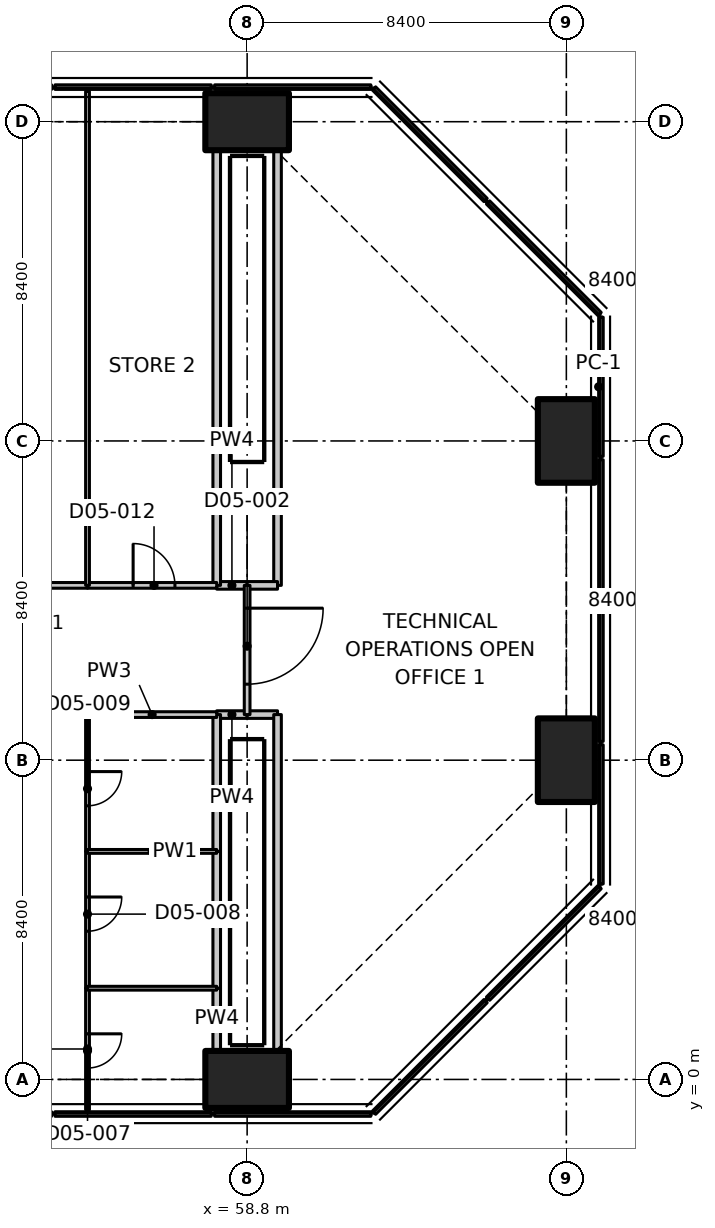
"""IFC4 building model, lengths in metres.
Left out: names, types, materials, properties, quantities, classifications, styles, units other than length and angle.
Written with IfcOpenShell. Run it as: python <this file> out.ifc"""

import sys

from ifc_helpers import new_model, si_unit, direction, frame, frame_2d, origin, origin_2d, place, context, subcontext, project, spatial, polyline, rectangle, outline, extrude, element, fill, save


model = new_model("IFC4")
c1 = context("Model", 3, precision=1e-05, world=origin(), true_north=direction((0.0, 1.0)))
c2 = subcontext(c1, "Body", "Model", "MODEL_VIEW")
j1 = project(units=[si_unit("LENGTHUNIT", "METRE"), si_unit("PLANEANGLEUNIT", "RADIAN")], contexts=[c1])
p1 = place(None, origin())
s1 = spatial("IfcSite", under=j1, at=p1, CompositionType="ELEMENT")
p2 = place(p1, origin())
s2 = spatial("IfcBuilding", under=s1, at=p2, CompositionType="ELEMENT")
p3 = place(p2, frame((0.0, 0.0, 27.5)))
s3 = spatial("IfcBuildingStorey", under=s2, at=p3, CompositionType="ELEMENT", Elevation=27.5)
for number, where, z_axis, x_axis in (
    (1, (58.8, 0.0, 0.0), (0.0, 0.0, 1.0), (0.0, 1.0, 0.0)),
    (2, (58.8, 25.2, 0.0), (0.0, 0.0, 1.0), (0.0, 1.0, 0.0)),
    (3, (67.2, 8.4, 0.0), (0.0, 0.0, 1.0), (1.0, 0.0, 0.0)),
    (4, (67.2, 16.8, 0.0), (0.0, 0.0, 1.0), (1.0, 0.0, 0.0)),
):
    element("IfcColumn", number, at=place(p3, frame(where, z_axis=z_axis, x_axis=x_axis)), inside=s3, PredefinedType="COLUMN", context=c2, shape_type="SweptSolid", body=[
        extrude(rectangle(XDim=1.5, YDim=2.2, at=origin_2d()), origin(), (0.0, 0.0, 1.0), 4.25),
    ])
p4 = place(p3, origin())
e5 = element("IfcWall", 5, at=p4, inside=s3, PredefinedType="SOLIDWALL", context=c2, shape_type="SweptSolid", body=[
    extrude(outline(polyline([(57.855, -0.97), (57.855, -0.85), (53.745, -0.85), (53.745, -0.97), (57.855, -0.97)])), origin(), (0.0, 0.0, 1.0), 4.25),
])
p5 = place(p3, origin())
e6 = element("IfcWall", 6, at=p5, inside=s3, PredefinedType="SOLIDWALL", context=c2, shape_type="SweptSolid", body=[
    extrude(outline(polyline([(62.055, -0.97), (62.055, -0.85), (57.945, -0.85), (57.945, -0.97), (62.055, -0.97)])), origin(), (0.0, 0.0, 1.0), 4.25),
])
p6 = place(p3, origin())
e7 = element("IfcWall", 7, at=p6, inside=s3, PredefinedType="SOLIDWALL", context=c2, shape_type="SweptSolid", body=[
    extrude(outline(polyline([(62.096, -0.833), (65.033, 2.104), (65.118, 2.019), (62.181, -0.918), (62.096, -0.833)])), origin(), (0.0, 0.0, 1.0), 4.25),
])
p7 = place(p3, origin())
e8 = element("IfcWall", 8, at=p7, inside=s3, PredefinedType="SOLIDWALL", context=c2, shape_type="SweptSolid", body=[
    extrude(outline(polyline([(65.096, 2.167), (68.033, 5.104), (68.118, 5.019), (65.181, 2.082), (65.096, 2.167)])), origin(), (0.0, 0.0, 1.0), 4.25),
])
p8 = place(p3, origin())
e9 = element("IfcWall", 9, at=p8, inside=s3, PredefinedType="SOLIDWALL", context=c2, shape_type="SweptSolid", body=[
    extrude(outline(polyline([(68.17, 8.805), (68.05, 8.805), (68.05, 5.145), (68.17, 5.145), (68.17, 8.805)])), origin(), (0.0, 0.0, 1.0), 4.25),
])
p9 = place(p3, origin())
e10 = element("IfcWall", 10, at=p9, inside=s3, PredefinedType="SOLIDWALL", context=c2, shape_type="SweptSolid", body=[
    extrude(outline(polyline([(68.17, 12.555), (68.05, 12.555), (68.05, 8.895), (68.17, 8.895), (68.17, 12.555)])), origin(), (0.0, 0.0, 1.0), 4.25),
])
p10 = place(p3, origin())
e11 = element("IfcWall", 11, at=p10, inside=s3, PredefinedType="SOLIDWALL", context=c2, shape_type="SweptSolid", body=[
    extrude(outline(polyline([(68.17, 16.305), (68.05, 16.305), (68.05, 12.645), (68.17, 12.645), (68.17, 16.305)])), origin(), (0.0, 0.0, 1.0), 4.25),
])
p11 = place(p3, origin())
e12 = element("IfcWall", 12, at=p11, inside=s3, PredefinedType="SOLIDWALL", context=c2, shape_type="SweptSolid", body=[
    extrude(outline(polyline([(68.17, 20.055), (68.05, 20.055), (68.05, 16.395), (68.17, 16.395), (68.17, 20.055)])), origin(), (0.0, 0.0, 1.0), 4.25),
])
p12 = place(p3, origin())
e13 = element("IfcWall", 13, at=p12, inside=s3, PredefinedType="SOLIDWALL", context=c2, shape_type="SweptSolid", body=[
    extrude(outline(polyline([(68.033, 20.096), (65.096, 23.033), (65.181, 23.118), (68.118, 20.181), (68.033, 20.096)])), origin(), (0.0, 0.0, 1.0), 4.25),
])
p13 = place(p3, origin())
e14 = element("IfcWall", 14, at=p13, inside=s3, PredefinedType="SOLIDWALL", context=c2, shape_type="SweptSolid", body=[
    extrude(outline(polyline([(65.033, 23.096), (62.096, 26.033), (62.181, 26.118), (65.118, 23.181), (65.033, 23.096)])), origin(), (0.0, 0.0, 1.0), 4.25),
])
p14 = place(p3, origin())
e15 = element("IfcWall", 15, at=p14, inside=s3, PredefinedType="SOLIDWALL", context=c2, shape_type="SweptSolid", body=[
    extrude(outline(polyline([(57.945, 26.17), (57.945, 26.05), (62.055, 26.05), (62.055, 26.17), (57.945, 26.17)])), origin(), (0.0, 0.0, 1.0), 4.25),
])
p15 = place(p3, origin())
e16 = element("IfcWall", 16, at=p15, inside=s3, PredefinedType="SOLIDWALL", context=c2, shape_type="SweptSolid", body=[
    extrude(outline(polyline([(53.745, 26.17), (53.745, 26.05), (57.855, 26.05), (57.855, 26.17), (53.745, 26.17)])), origin(), (0.0, 0.0, 1.0), 4.25),
])
for number, where, z_axis, x_axis in (
    (17, (58.0, 9.6, 0.0), (0.0, 0.0, 1.0), (1.0, 0.0, 0.0)),
    (18, (58.8, 9.6, 0.0), (0.0, 0.0, 1.0), (1.0, 0.0, 0.0)),
):
    element("IfcWall", number, at=place(p3, frame(where, z_axis=z_axis, x_axis=x_axis)), inside=s3, PredefinedType="PARTITIONING", context=c2, shape_type="SweptSolid", body=[
        extrude(rectangle(XDim=0.8, YDim=0.2, at=frame_2d((0.4, 0.0))), origin(), (0.0, 0.0, 1.0), 4.23),
    ])
p16 = place(p3, frame((59.6, 9.6, 0.0), z_axis=(0.0, 0.0, 1.0), x_axis=(0.0, -1.0, 0.0)))
e19 = element("IfcWall", 19, at=p16, inside=s3, PredefinedType="PARTITIONING", context=c2, shape_type="SweptSolid", body=[
    extrude(outline(polyline([(0.0, 0.0), (8.83, 0.0), (8.83, 3.88), (8.086, 3.88), (8.084, 4.23), (0.0, 4.23), (0.0, 0.0)])), frame((0.0, 0.1, 0.0), z_axis=(0.0, -1.0, 0.0), x_axis=(1.0, 0.0, 0.0)), (0.0, 0.0, 1.0), 0.2),
])
p17 = place(p3, frame((58.0, 0.77, 0.0), z_axis=(0.0, 0.0, 1.0), x_axis=(0.0, 1.0, 0.0)))
e20 = element("IfcWall", 20, at=p17, inside=s3, PredefinedType="PARTITIONING", context=c2, shape_type="SweptSolid", body=[
    extrude(rectangle(XDim=1.63, YDim=0.2, at=frame_2d((0.815, 0.0))), origin(), (0.0, 0.0, 1.0), 4.23),
])
for number, where, z_axis, x_axis in (
    (21, (58.0, 2.4, 0.0), (0.0, 0.0, 1.0), (0.0, 1.0, 0.0)),
    (22, (58.0, 6.0, 0.0), (0.0, 0.0, 1.0), (0.0, 1.0, 0.0)),
):
    element("IfcWall", number, at=place(p3, frame(where, z_axis=z_axis, x_axis=x_axis)), inside=s3, PredefinedType="PARTITIONING", context=c2, shape_type="SweptSolid", body=[
        extrude(rectangle(XDim=3.6, YDim=0.2, at=frame_2d((1.8, 0.0))), origin(), (0.0, 0.0, 1.0), 4.23),
    ])
p18 = place(p3, frame((58.8, 13.0, 0.0), z_axis=(0.0, 0.0, 1.0), x_axis=(-1.0, 0.0, 0.0)))
e23 = element("IfcWall", 23, at=p18, inside=s3, PredefinedType="PARTITIONING", context=c2, shape_type="SweptSolid", body=[
    extrude(rectangle(XDim=0.8, YDim=0.2, at=frame_2d((0.4, 0.0))), origin(), (0.0, 0.0, 1.0), 4.23),
])
p19 = place(p3, frame((59.6, 24.43, 0.0), z_axis=(0.0, 0.0, 1.0), x_axis=(0.0, -1.0, 0.0)))
e24 = element("IfcWall", 24, at=p19, inside=s3, PredefinedType="PARTITIONING", context=c2, shape_type="SweptSolid", body=[
    extrude(outline(polyline([(0.0, 0.0), (11.43, 0.0), (11.43, 4.23), (0.746, 4.23), (0.744, 3.88), (0.0, 3.88), (0.0, 0.0)])), frame((0.0, 0.1, 0.0), z_axis=(0.0, -1.0, 0.0), x_axis=(1.0, 0.0, 0.0)), (0.0, 0.0, 1.0), 0.2),
])
p20 = place(p3, frame((59.6, 13.0, 0.0), z_axis=(0.0, 0.0, 1.0), x_axis=(-1.0, 0.0, 0.0)))
e25 = element("IfcWall", 25, at=p20, inside=s3, PredefinedType="PARTITIONING", context=c2, shape_type="SweptSolid", body=[
    extrude(rectangle(XDim=0.8, YDim=0.2, at=frame_2d((0.4, 0.0))), origin(), (0.0, 0.0, 1.0), 4.23),
])
p21 = place(p3, frame((58.0, 13.0, 0.0), z_axis=(0.0, 0.0, 1.0), x_axis=(0.0, 1.0, 0.0)))
e26 = element("IfcWall", 26, at=p21, inside=s3, PredefinedType="PARTITIONING", context=c2, shape_type="SweptSolid", body=[
    extrude(rectangle(XDim=11.43, YDim=0.2, at=frame_2d((5.715, 0.0))), origin(), (0.0, 0.0, 1.0), 4.23),
])
p22 = place(p3, frame((58.8, 13.0, 0.0), z_axis=(0.0, 0.0, 1.0), x_axis=(0.0, -1.0, 0.0)))
e27 = element("IfcWall", 27, at=p22, inside=s3, PredefinedType="PARTITIONING", context=c2, shape_type="SweptSolid", body=[
    extrude(rectangle(XDim=3.4, YDim=0.15, at=frame_2d((1.7, 0.0))), origin(), (0.0, 0.0, 1.0), 4.23),
])
p23 = place(p22, frame((0.6, 0.0, 0.0)))
e28 = element("IfcOpeningElement", 28, at=p23, cuts=e27, PredefinedType="OPENING", context=c2, shape_type="SweptSolid", body=[
    extrude(rectangle(XDim=2.0, YDim=2.4, at=frame_2d((1.0, 1.2))), frame((0.0, 0.085, 0.0), z_axis=(0.0, -1.0, 0.0), x_axis=(1.0, 0.0, 0.0)), (0.0, 0.0, 1.0), 0.17),
])
p24 = place(p3, frame((54.6, 9.6, 0.0), z_axis=(0.0, 0.0, 1.0), x_axis=(-1.0, 0.0, 0.0)))
e29 = element("IfcWall", 29, at=p24, inside=s3, PredefinedType="PARTITIONING", context=c2, shape_type="SweptSolid", body=[
    extrude(rectangle(XDim=12.6, YDim=0.15, at=frame_2d((6.3, 0.0))), origin(), (0.0, 0.0, 1.0), 4.23),
])
p25 = place(p24, frame((5.4, 0.0, 0.0)))
e30 = element("IfcOpeningElement", 30, at=p25, cuts=e29, PredefinedType="OPENING", context=c2, shape_type="SweptSolid", body=[
    extrude(rectangle(XDim=1.8, YDim=2.1, at=frame_2d((0.9, 1.05))), frame((0.0, 0.085, 0.0), z_axis=(0.0, -1.0, 0.0), x_axis=(1.0, 0.0, 0.0)), (0.0, 0.0, 1.0), 0.17),
])
p26 = place(p3, frame((58.0, 9.6, 0.0), z_axis=(0.0, 0.0, 1.0), x_axis=(-1.0, 0.0, 0.0)))
e31 = element("IfcWall", 31, at=p26, inside=s3, PredefinedType="PARTITIONING", context=c2, shape_type="SweptSolid", body=[
    extrude(rectangle(XDim=3.4, YDim=0.15, at=frame_2d((1.7, 0.0))), origin(), (0.0, 0.0, 1.0), 4.23),
])
p27 = place(p3, frame((49.4, 13.0, 0.0), z_axis=(0.0, 0.0, 1.0), x_axis=(1.0, 0.0, 0.0)))
e32 = element("IfcWall", 32, at=p27, inside=s3, PredefinedType="PARTITIONING", context=c2, shape_type="SweptSolid", body=[
    extrude(rectangle(XDim=5.2, YDim=0.15, at=frame_2d((2.6, 0.0))), origin(), (0.0, 0.0, 1.0), 4.23),
])
p28 = place(p3, frame((54.6, 13.0, 0.0), z_axis=(0.0, 0.0, 1.0), x_axis=(1.0, 0.0, 0.0)))
e33 = element("IfcWall", 33, at=p28, inside=s3, PredefinedType="PARTITIONING", context=c2, shape_type="SweptSolid", body=[
    extrude(rectangle(XDim=3.4, YDim=0.15, at=frame_2d((1.7, 0.0))), origin(), (0.0, 0.0, 1.0), 4.23),
])
p29 = place(p28, frame((1.2, 0.0, 0.0)))
e34 = element("IfcOpeningElement", 34, at=p29, cuts=e33, PredefinedType="OPENING", context=c2, shape_type="SweptSolid", body=[
    extrude(rectangle(XDim=1.1, YDim=2.1, at=frame_2d((0.55, 1.05))), frame((0.0, 0.085, 0.0), z_axis=(0.0, -1.0, 0.0), x_axis=(1.0, 0.0, 0.0)), (0.0, 0.0, 1.0), 0.17),
])
p30 = place(p3, frame((54.6, 2.4, 0.0), z_axis=(0.0, 0.0, 1.0), x_axis=(0.0, -1.0, 0.0)))
e35 = element("IfcWall", 35, at=p30, inside=s3, PredefinedType="PARTITIONING", context=c2, shape_type="SweptSolid", body=[
    extrude(rectangle(XDim=3.198, YDim=0.1, at=frame_2d((1.599, 0.0))), origin(), (0.0, 0.0, 1.0), 3.88),
])
p31 = place(p30, frame((1.2, 0.0, 0.0)))
e36 = element("IfcOpeningElement", 36, at=p31, cuts=e35, PredefinedType="OPENING", context=c2, shape_type="SweptSolid", body=[
    extrude(rectangle(XDim=0.9, YDim=2.1, at=frame_2d((0.45, 1.05))), frame((0.0, 0.06, 0.0), z_axis=(0.0, -1.0, 0.0), x_axis=(1.0, 0.0, 0.0)), (0.0, 0.0, 1.0), 0.12),
])
p32 = place(p3, frame((54.6, 6.0, 0.0), z_axis=(0.0, 0.0, 1.0), x_axis=(0.0, -1.0, 0.0)))
e37 = element("IfcWall", 37, at=p32, inside=s3, PredefinedType="PARTITIONING", context=c2, shape_type="SweptSolid", body=[
    extrude(rectangle(XDim=3.6, YDim=0.1, at=frame_2d((1.8, 0.0))), origin(), (0.0, 0.0, 1.0), 4.23),
])
p33 = place(p32, frame((1.2, 0.0, 0.0)))
e38 = element("IfcOpeningElement", 38, at=p33, cuts=e37, PredefinedType="OPENING", context=c2, shape_type="SweptSolid", body=[
    extrude(rectangle(XDim=0.9, YDim=2.1, at=frame_2d((0.45, 1.05))), frame((0.0, 0.06, 0.0), z_axis=(0.0, -1.0, 0.0), x_axis=(1.0, 0.0, 0.0)), (0.0, 0.0, 1.0), 0.12),
])
p34 = place(p3, frame((54.6, 9.6, 0.0), z_axis=(0.0, 0.0, 1.0), x_axis=(0.0, -1.0, 0.0)))
e39 = element("IfcWall", 39, at=p34, inside=s3, PredefinedType="PARTITIONING", context=c2, shape_type="SweptSolid", body=[
    extrude(rectangle(XDim=3.6, YDim=0.1, at=frame_2d((1.8, 0.0))), origin(), (0.0, 0.0, 1.0), 4.23),
])
p35 = place(p34, frame((1.5, 0.0, 0.0)))
e40 = element("IfcOpeningElement", 40, at=p35, cuts=e39, PredefinedType="OPENING", context=c2, shape_type="SweptSolid", body=[
    extrude(rectangle(XDim=0.9, YDim=2.1, at=frame_2d((0.45, 1.05))), frame((0.0, 0.06, 0.0), z_axis=(0.0, -1.0, 0.0), x_axis=(1.0, 0.0, 0.0)), (0.0, 0.0, 1.0), 0.12),
])
for number, where, z_axis, x_axis in (
    (41, (54.6, 2.4, 0.0), (0.0, 0.0, 1.0), (1.0, 0.0, 0.0)),
    (42, (54.6, 6.0, 0.0), (0.0, 0.0, 1.0), (1.0, 0.0, 0.0)),
):
    element("IfcWall", number, at=place(p3, frame(where, z_axis=z_axis, x_axis=x_axis)), inside=s3, PredefinedType="PARTITIONING", context=c2, shape_type="SweptSolid", body=[
        extrude(rectangle(XDim=3.4, YDim=0.1, at=frame_2d((1.7, 0.0))), origin(), (0.0, 0.0, 1.0), 4.23),
    ])
p36 = place(p3, frame((54.6, 25.998, 0.0), z_axis=(0.0, 0.0, 1.0), x_axis=(0.0, -1.0, 0.0)))
e43 = element("IfcWall", 43, at=p36, inside=s3, PredefinedType="PARTITIONING", context=c2, shape_type="SweptSolid", body=[
    extrude(outline(polyline([(0.0, 0.0), (12.998, 0.0), (12.998, 4.23), (1.248, 4.23), (1.246, 3.88), (0.35, 3.88), (0.348, 4.23), (0.0, 4.23), (0.0, 0.0)])), frame((0.0, 0.05, 0.0), z_axis=(0.0, -1.0, 0.0), x_axis=(1.0, 0.0, 0.0)), (0.0, 0.0, 1.0), 0.1),
])
p37 = place(p23, origin())
e44 = element("IfcDoor", 44, at=p37, inside=s3, OperationType="DOUBLE_DOOR_SINGLE_SWING", PredefinedType="DOOR", context=c2, shape_type="SweptSolid", body=[
    extrude(rectangle(XDim=2.0, YDim=2.4, at=frame_2d((1.0, 1.2))), frame((0.0, 0.025, 0.0), z_axis=(0.0, -1.0, 0.0), x_axis=(1.0, 0.0, 0.0)), (0.0, 0.0, 1.0), 0.05),
])
fill(e28, e44)
p38 = place(p31, origin())
e45 = element("IfcDoor", 45, at=p38, inside=s3, OperationType="SINGLE_SWING_LEFT", PredefinedType="DOOR", context=c2, shape_type="SweptSolid", body=[
    extrude(rectangle(XDim=0.9, YDim=2.1, at=frame_2d((0.45, 1.05))), frame((0.0, 0.025, 0.0), z_axis=(0.0, -1.0, 0.0), x_axis=(1.0, 0.0, 0.0)), (0.0, 0.0, 1.0), 0.05),
])
fill(e36, e45)
p39 = place(p33, origin())
e46 = element("IfcDoor", 46, at=p39, inside=s3, OperationType="SINGLE_SWING_LEFT", PredefinedType="DOOR", context=c2, shape_type="SweptSolid", body=[
    extrude(rectangle(XDim=0.9, YDim=2.1, at=frame_2d((0.45, 1.05))), frame((0.0, 0.025, 0.0), z_axis=(0.0, -1.0, 0.0), x_axis=(1.0, 0.0, 0.0)), (0.0, 0.0, 1.0), 0.05),
])
fill(e38, e46)
p40 = place(p35, origin())
e47 = element("IfcDoor", 47, at=p40, inside=s3, OperationType="SINGLE_SWING_LEFT", PredefinedType="DOOR", context=c2, shape_type="SweptSolid", body=[
    extrude(rectangle(XDim=0.9, YDim=2.1, at=frame_2d((0.45, 1.05))), frame((0.0, 0.025, 0.0), z_axis=(0.0, -1.0, 0.0), x_axis=(1.0, 0.0, 0.0)), (0.0, 0.0, 1.0), 0.05),
])
fill(e40, e47)
p41 = place(p29, origin())
e48 = element("IfcDoor", 48, at=p41, inside=s3, OperationType="SINGLE_SWING_LEFT", PredefinedType="DOOR", context=c2, shape_type="SweptSolid", body=[
    extrude(rectangle(XDim=1.1, YDim=2.1, at=frame_2d((0.55, 1.05))), frame((0.0, 0.025, 0.0), z_axis=(0.0, -1.0, 0.0), x_axis=(1.0, 0.0, 0.0)), (0.0, 0.0, 1.0), 0.05),
])
fill(e34, e48)
save(model, sys.argv[1])
